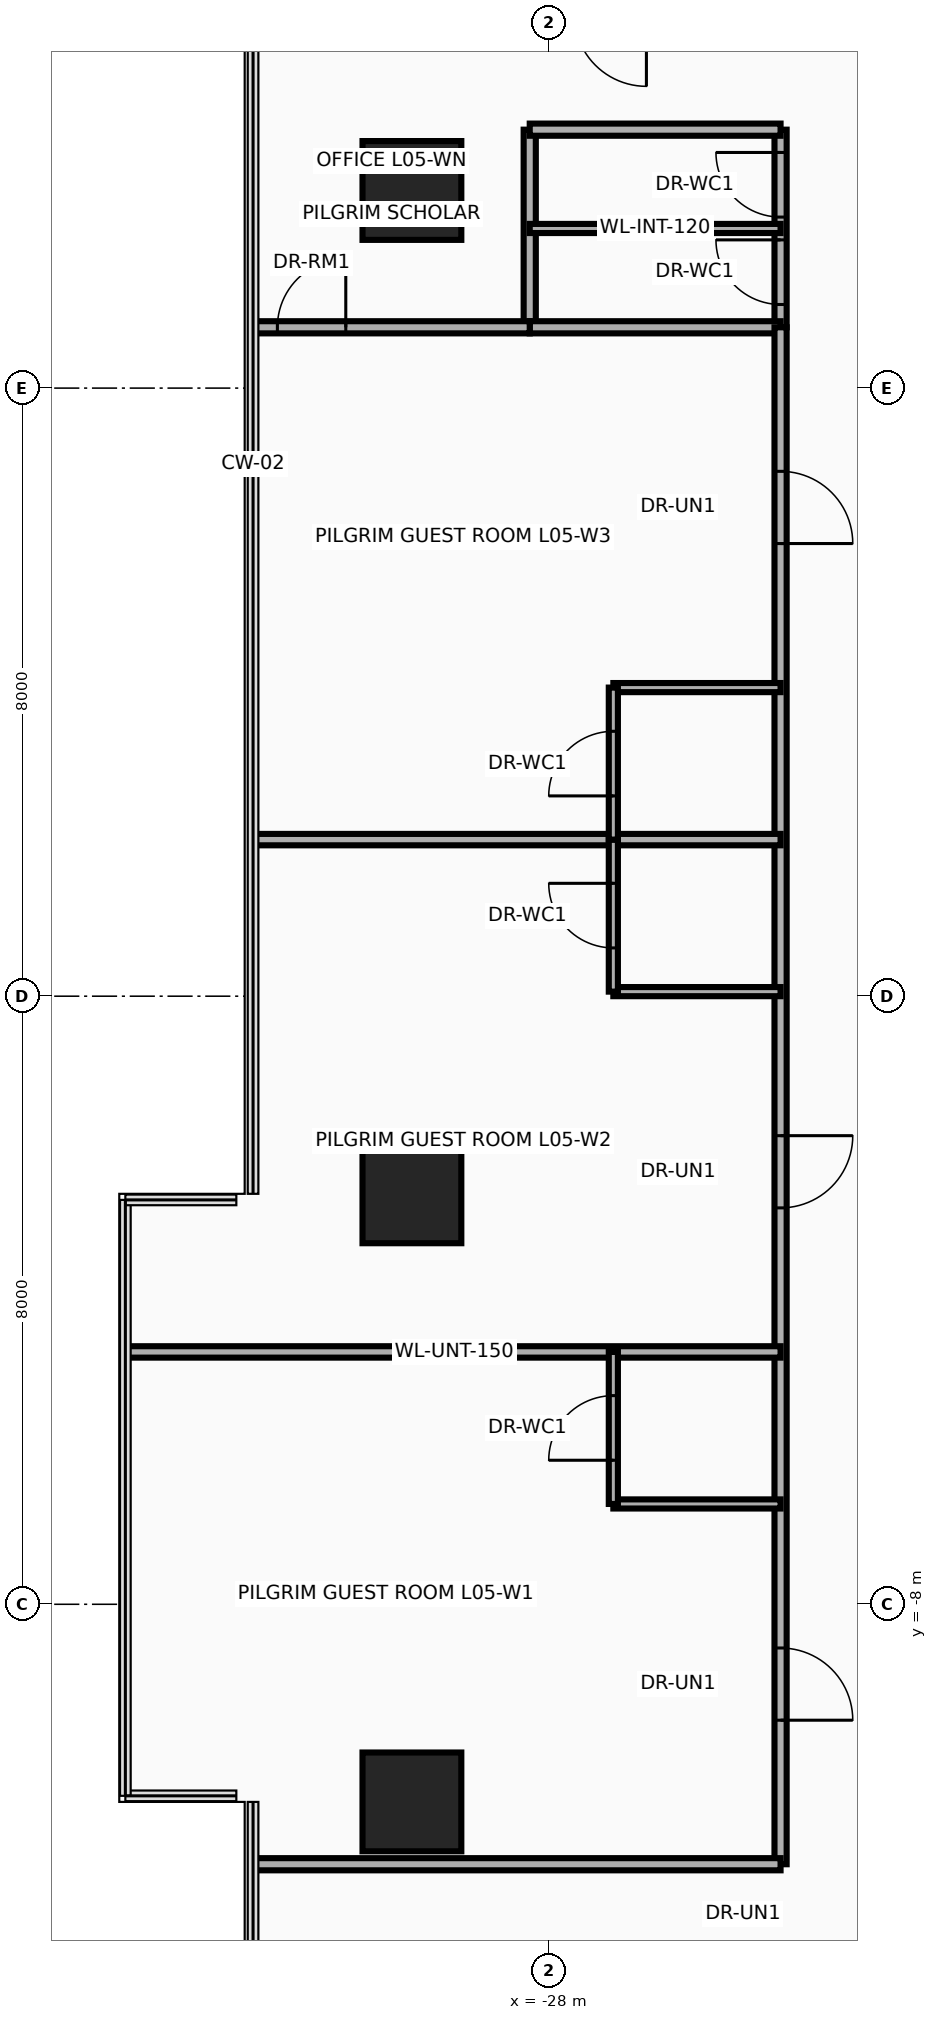
"""IFC4 building model, lengths in metres.
Left out: names, types, materials, properties, quantities, classifications, styles, units other than length and angle.
Written with IfcOpenShell. Run it as: python <this file> out.ifc"""

import sys

from ifc_helpers import new_model, si_unit, direction, frame, frame_2d, origin, origin_2d, place, context, subcontext, project, spatial, rectangle, circle, extrude, source, transform, mapped, element, fill, save


model = new_model("IFC4")
c1 = context("Model", 3, precision=1e-05, world=origin(), true_north=direction((0.0, 1.0)))
c2 = subcontext(c1, "Body", "Model", "MODEL_VIEW")
j1 = project(units=[si_unit("LENGTHUNIT", "METRE"), si_unit("PLANEANGLEUNIT", "RADIAN")], contexts=[c1])
p1 = place(None, origin())
s1 = spatial("IfcSite", under=j1, at=p1, CompositionType="ELEMENT")
p2 = place(p1, origin())
s2 = spatial("IfcBuilding", under=s1, at=p2, CompositionType="ELEMENT")
p3 = place(p2, frame((0.0, 0.0, 26.0)))
s3 = spatial("IfcBuildingStorey", under=s2, at=p3, CompositionType="ELEMENT", Elevation=26.0)
m1 = source(origin(), c2, "Body", "SweptSolid", [
    extrude(circle(Radius=0.65, at=origin_2d()), origin(), (0.0, 0.0, 1.0), 3.7),
])
for number, where, z_axis, x_axis in (
    (1, (-29.8, -10.6, 0.0), (0.0, 0.0, 1.0), (1.0, 0.0, 0.0)),
    (2, (-29.8, -2.6, 0.0), (0.0, 0.0, 1.0), (1.0, 0.0, 0.0)),
    (3, (-29.8, 10.6, 0.0), (0.0, 0.0, 1.0), (1.0, 0.0, 0.0)),
):
    element("IfcColumn", number, at=place(p3, frame(where, z_axis=z_axis, x_axis=x_axis)), inside=s3, PredefinedType="COLUMN", context=c2, shape_type="MappedRepresentation", body=[
        mapped(m1, transform((0.0, 0.0, 0.0), x_axis=(1.0, 0.0, 0.0), y_axis=(0.0, 1.0, 0.0), z_axis=(0.0, 0.0, 1.0), scale=1.0)),
    ])
p4 = place(p3, frame((-28.25, 8.8, 0.0), z_axis=(0.0, 0.0, 1.0), x_axis=(0.0, 1.0, 0.0)))
e4 = element("IfcWall", 4, at=p4, inside=s3, PredefinedType="PARTITIONING", context=c2, shape_type="SweptSolid", body=[
    extrude(rectangle(XDim=2.6, YDim=0.16, at=frame_2d((1.3, 0.0))), origin(), (0.0, 0.0, 1.0), 2.583),
])
p5 = place(p3, frame((-24.95, 8.8, 0.0), z_axis=(0.0, 0.0, 1.0), x_axis=(0.0, 1.0, 0.0)))
e5 = element("IfcWall", 5, at=p5, inside=s3, PredefinedType="PARTITIONING", context=c2, shape_type="SweptSolid", body=[
    extrude(rectangle(XDim=2.6, YDim=0.16, at=frame_2d((1.3, 0.0))), origin(), (0.0, 0.0, 1.0), 2.583),
])
p6 = place(p5, frame((0.3, 0.0, 0.0)))
e6 = element("IfcOpeningElement", 6, at=p6, cuts=e5, PredefinedType="OPENING", context=c2, shape_type="SweptSolid", body=[
    extrude(rectangle(XDim=0.85, YDim=2.1, at=frame_2d((0.425, 1.05))), frame((0.0, 0.095, 0.0), z_axis=(0.0, -1.0, 0.0), x_axis=(1.0, 0.0, 0.0)), (0.0, 0.0, 1.0), 0.19),
])
p7 = place(p5, frame((1.45, 0.0, 0.0)))
e7 = element("IfcOpeningElement", 7, at=p7, cuts=e5, PredefinedType="OPENING", context=c2, shape_type="SweptSolid", body=[
    extrude(rectangle(XDim=0.85, YDim=2.1, at=frame_2d((0.425, 1.05))), frame((0.0, 0.095, 0.0), z_axis=(0.0, -1.0, 0.0), x_axis=(1.0, 0.0, 0.0)), (0.0, 0.0, 1.0), 0.19),
])
for number, where, z_axis, x_axis in (
    (8, (-28.25, 8.8, 0.0), (0.0, 0.0, 1.0), (1.0, 0.0, 0.0)),
    (9, (-28.25, 11.4, 0.0), (0.0, 0.0, 1.0), (1.0, 0.0, 0.0)),
):
    element("IfcWall", number, at=place(p3, frame(where, z_axis=z_axis, x_axis=x_axis)), inside=s3, PredefinedType="PARTITIONING", context=c2, shape_type="SweptSolid", body=[
        extrude(rectangle(XDim=3.3, YDim=0.16, at=frame_2d((1.65, 0.0))), origin(), (0.0, 0.0, 1.0), 3.46),
    ])
p8 = place(p3, frame((-28.25, 10.1, 0.0), z_axis=(0.0, 0.0, 1.0), x_axis=(1.0, 0.0, 0.0)))
e10 = element("IfcWall", 10, at=p8, inside=s3, PredefinedType="PARTITIONING", context=c2, shape_type="SweptSolid", body=[
    extrude(rectangle(XDim=3.3, YDim=0.12, at=frame_2d((1.65, 0.0))), origin(), (0.0, 0.0, 1.0), 3.46),
])
p9 = place(p3, frame((-24.95, -11.42, 0.0), z_axis=(0.0, 0.0, 1.0), x_axis=(0.0, 1.0, 0.0)))
e11 = element("IfcWall", 11, at=p9, inside=s3, PredefinedType="PARTITIONING", context=c2, shape_type="SweptSolid", body=[
    extrude(rectangle(XDim=20.22, YDim=0.16, at=frame_2d((10.11, 0.0))), origin(), (0.0, 0.0, 1.0), 2.583),
])
p10 = place(p9, frame((1.895, 0.0, 0.0)))
e12 = element("IfcOpeningElement", 12, at=p10, cuts=e11, PredefinedType="OPENING", context=c2, shape_type="SweptSolid", body=[
    extrude(rectangle(XDim=0.95, YDim=2.15, at=frame_2d((0.475, 1.075))), frame((0.0, 0.095, 0.0), z_axis=(0.0, -1.0, 0.0), x_axis=(1.0, 0.0, 0.0)), (0.0, 0.0, 1.0), 0.19),
])
p11 = place(p9, frame((8.635, 0.0, 0.0)))
e13 = element("IfcOpeningElement", 13, at=p11, cuts=e11, PredefinedType="OPENING", context=c2, shape_type="SweptSolid", body=[
    extrude(rectangle(XDim=0.95, YDim=2.15, at=frame_2d((0.475, 1.075))), frame((0.0, 0.095, 0.0), z_axis=(0.0, -1.0, 0.0), x_axis=(1.0, 0.0, 0.0)), (0.0, 0.0, 1.0), 0.19),
])
p12 = place(p9, frame((17.375, 0.0, 0.0)))
e14 = element("IfcOpeningElement", 14, at=p12, cuts=e11, PredefinedType="OPENING", context=c2, shape_type="SweptSolid", body=[
    extrude(rectangle(XDim=0.95, YDim=2.15, at=frame_2d((0.475, 1.075))), frame((0.0, 0.095, 0.0), z_axis=(0.0, -1.0, 0.0), x_axis=(1.0, 0.0, 0.0)), (0.0, 0.0, 1.0), 0.19),
])
p13 = place(p3, frame((-31.89, 8.8, 0.0), z_axis=(0.0, 0.0, 1.0), x_axis=(1.0, 0.0, 0.0)))
e15 = element("IfcWall", 15, at=p13, inside=s3, PredefinedType="PARTITIONING", context=c2, shape_type="SweptSolid", body=[
    extrude(rectangle(XDim=3.64, YDim=0.16, at=frame_2d((1.82, 0.0))), origin(), (0.0, 0.0, 1.0), 2.896),
])
p14 = place(p13, frame((0.32, 0.0, 0.0)))
e16 = element("IfcOpeningElement", 16, at=p14, cuts=e15, PredefinedType="OPENING", context=c2, shape_type="SweptSolid", body=[
    extrude(rectangle(XDim=0.9, YDim=2.1, at=frame_2d((0.45, 1.05))), frame((0.0, 0.095, 0.0), z_axis=(0.0, -1.0, 0.0), x_axis=(1.0, 0.0, 0.0)), (0.0, 0.0, 1.0), 0.19),
])
p15 = place(p3, frame((-33.54, -4.68, 0.0), z_axis=(0.0, 0.0, 1.0), x_axis=(1.0, 0.0, 0.0)))
e17 = element("IfcWall", 17, at=p15, inside=s3, PredefinedType="PARTITIONING", context=c2, shape_type="SweptSolid", body=[
    extrude(rectangle(XDim=8.59, YDim=0.15, at=frame_2d((4.295, 0.0))), origin(), (0.0, 0.0, 1.0), 2.896),
])
p16 = place(p3, frame((-31.89, 2.06, 0.0), z_axis=(0.0, 0.0, 1.0), x_axis=(1.0, 0.0, 0.0)))
e18 = element("IfcWall", 18, at=p16, inside=s3, PredefinedType="PARTITIONING", context=c2, shape_type="SweptSolid", body=[
    extrude(rectangle(XDim=6.94, YDim=0.15, at=frame_2d((3.47, 0.0))), origin(), (0.0, 0.0, 1.0), 2.896),
])
p17 = place(p3, frame((-27.15, -6.68, 0.0), z_axis=(0.0, 0.0, 1.0), x_axis=(1.0, 0.0, 0.0)))
e19 = element("IfcWall", 19, at=p17, inside=s3, PredefinedType="PARTITIONING", context=c2, shape_type="SweptSolid", body=[
    extrude(rectangle(XDim=2.2, YDim=0.12, at=frame_2d((1.1, 0.0))), origin(), (0.0, 0.0, 1.0), 2.979),
])
p18 = place(p3, frame((-27.15, -6.68, 0.0), z_axis=(0.0, 0.0, 1.0), x_axis=(0.0, 1.0, 0.0)))
e20 = element("IfcWall", 20, at=p18, inside=s3, PredefinedType="PARTITIONING", context=c2, shape_type="SweptSolid", body=[
    extrude(rectangle(XDim=2.0, YDim=0.12, at=frame_2d((1.0, 0.0))), origin(), (0.0, 0.0, 1.0), 2.979),
])
p19 = place(p18, frame((0.575, 0.0, 0.0)))
e21 = element("IfcOpeningElement", 21, at=p19, cuts=e20, PredefinedType="OPENING", context=c2, shape_type="SweptSolid", body=[
    extrude(rectangle(XDim=0.85, YDim=2.1, at=frame_2d((0.425, 1.05))), frame((0.0, 0.075, 0.0), z_axis=(0.0, -1.0, 0.0), x_axis=(1.0, 0.0, 0.0)), (0.0, 0.0, 1.0), 0.15),
])
p20 = place(p3, frame((-27.15, 0.06, 0.0), z_axis=(0.0, 0.0, 1.0), x_axis=(1.0, 0.0, 0.0)))
e22 = element("IfcWall", 22, at=p20, inside=s3, PredefinedType="PARTITIONING", context=c2, shape_type="SweptSolid", body=[
    extrude(rectangle(XDim=2.2, YDim=0.12, at=frame_2d((1.1, 0.0))), origin(), (0.0, 0.0, 1.0), 2.979),
])
p21 = place(p3, frame((-27.15, 0.06, 0.0), z_axis=(0.0, 0.0, 1.0), x_axis=(0.0, 1.0, 0.0)))
e23 = element("IfcWall", 23, at=p21, inside=s3, PredefinedType="PARTITIONING", context=c2, shape_type="SweptSolid", body=[
    extrude(rectangle(XDim=2.0, YDim=0.12, at=frame_2d((1.0, 0.0))), origin(), (0.0, 0.0, 1.0), 2.979),
])
p22 = place(p21, frame((0.575, 0.0, 0.0)))
e24 = element("IfcOpeningElement", 24, at=p22, cuts=e23, PredefinedType="OPENING", context=c2, shape_type="SweptSolid", body=[
    extrude(rectangle(XDim=0.85, YDim=2.1, at=frame_2d((0.425, 1.05))), frame((0.0, 0.075, 0.0), z_axis=(0.0, -1.0, 0.0), x_axis=(1.0, 0.0, 0.0)), (0.0, 0.0, 1.0), 0.15),
])
p23 = place(p3, frame((-27.15, 4.06, 0.0), z_axis=(0.0, 0.0, 1.0), x_axis=(1.0, 0.0, 0.0)))
e25 = element("IfcWall", 25, at=p23, inside=s3, PredefinedType="PARTITIONING", context=c2, shape_type="SweptSolid", body=[
    extrude(rectangle(XDim=2.2, YDim=0.12, at=frame_2d((1.1, 0.0))), origin(), (0.0, 0.0, 1.0), 3.46),
])
p24 = place(p3, frame((-27.15, 2.06, 0.0), z_axis=(0.0, 0.0, 1.0), x_axis=(0.0, 1.0, 0.0)))
e26 = element("IfcWall", 26, at=p24, inside=s3, PredefinedType="PARTITIONING", context=c2, shape_type="SweptSolid", body=[
    extrude(rectangle(XDim=2.0, YDim=0.12, at=frame_2d((1.0, 0.0))), origin(), (0.0, 0.0, 1.0), 2.979),
])
p25 = place(p24, frame((0.575, 0.0, 0.0)))
e27 = element("IfcOpeningElement", 27, at=p25, cuts=e26, PredefinedType="OPENING", context=c2, shape_type="SweptSolid", body=[
    extrude(rectangle(XDim=0.85, YDim=2.1, at=frame_2d((0.425, 1.05))), frame((0.0, 0.075, 0.0), z_axis=(0.0, -1.0, 0.0), x_axis=(1.0, 0.0, 0.0)), (0.0, 0.0, 1.0), 0.15),
])
p26 = place(p3, frame((-31.89, -11.42, 0.0), z_axis=(0.0, 0.0, 1.0), x_axis=(1.0, 0.0, 0.0)))
e28 = element("IfcWall", 28, at=p26, inside=s3, PredefinedType="PARTITIONING", context=c2, shape_type="SweptSolid", body=[
    extrude(rectangle(XDim=6.94, YDim=0.16, at=frame_2d((3.47, 0.0))), origin(), (0.0, 0.0, 1.0), 3.46),
])
p27 = place(p6, origin())
e29 = element("IfcDoor", 29, at=p27, inside=s3, OperationType="SINGLE_SWING_RIGHT", PredefinedType="DOOR", context=c2, shape_type="SweptSolid", body=[
    extrude(rectangle(XDim=0.85, YDim=2.1, at=frame_2d((0.425, 1.05))), frame((0.0, 0.025, 0.0), z_axis=(0.0, -1.0, 0.0), x_axis=(1.0, 0.0, 0.0)), (0.0, 0.0, 1.0), 0.05),
])
fill(e6, e29)
p28 = place(p7, origin())
e30 = element("IfcDoor", 30, at=p28, inside=s3, OperationType="SINGLE_SWING_LEFT", PredefinedType="DOOR", context=c2, shape_type="SweptSolid", body=[
    extrude(rectangle(XDim=0.85, YDim=2.1, at=frame_2d((0.425, 1.05))), frame((0.0, 0.025, 0.0), z_axis=(0.0, -1.0, 0.0), x_axis=(1.0, 0.0, 0.0)), (0.0, 0.0, 1.0), 0.05),
])
fill(e7, e30)
p29 = place(p14, origin())
e31 = element("IfcDoor", 31, at=p29, inside=s3, OperationType="SINGLE_SWING_RIGHT", PredefinedType="DOOR", context=c2, shape_type="SweptSolid", body=[
    extrude(rectangle(XDim=0.9, YDim=2.1, at=frame_2d((0.45, 1.05))), frame((0.0, 0.025, 0.0), z_axis=(0.0, -1.0, 0.0), x_axis=(1.0, 0.0, 0.0)), (0.0, 0.0, 1.0), 0.05),
])
fill(e16, e31)
p30 = place(p10, frame((0.95, 0.0, 0.0), z_axis=(0.0, 0.0, 1.0), x_axis=(-1.0, 0.0, 0.0)))
e32 = element("IfcDoor", 32, at=p30, inside=s3, OperationType="SINGLE_SWING_LEFT", PredefinedType="DOOR", context=c2, shape_type="SweptSolid", body=[
    extrude(rectangle(XDim=0.95, YDim=2.15, at=frame_2d((0.475, 1.075))), frame((0.0, 0.025, 0.0), z_axis=(0.0, -1.0, 0.0), x_axis=(1.0, 0.0, 0.0)), (0.0, 0.0, 1.0), 0.05),
])
fill(e12, e32)
p31 = place(p19, origin())
e33 = element("IfcDoor", 33, at=p31, inside=s3, OperationType="SINGLE_SWING_RIGHT", PredefinedType="DOOR", context=c2, shape_type="SweptSolid", body=[
    extrude(rectangle(XDim=0.85, YDim=2.1, at=frame_2d((0.425, 1.05))), frame((0.0, 0.025, 0.0), z_axis=(0.0, -1.0, 0.0), x_axis=(1.0, 0.0, 0.0)), (0.0, 0.0, 1.0), 0.05),
])
fill(e21, e33)
p32 = place(p11, frame((0.95, 0.0, 0.0), z_axis=(0.0, 0.0, 1.0), x_axis=(-1.0, 0.0, 0.0)))
e34 = element("IfcDoor", 34, at=p32, inside=s3, OperationType="SINGLE_SWING_LEFT", PredefinedType="DOOR", context=c2, shape_type="SweptSolid", body=[
    extrude(rectangle(XDim=0.95, YDim=2.15, at=frame_2d((0.475, 1.075))), frame((0.0, 0.025, 0.0), z_axis=(0.0, -1.0, 0.0), x_axis=(1.0, 0.0, 0.0)), (0.0, 0.0, 1.0), 0.05),
])
fill(e13, e34)
p33 = place(p22, origin())
e35 = element("IfcDoor", 35, at=p33, inside=s3, OperationType="SINGLE_SWING_RIGHT", PredefinedType="DOOR", context=c2, shape_type="SweptSolid", body=[
    extrude(rectangle(XDim=0.85, YDim=2.1, at=frame_2d((0.425, 1.05))), frame((0.0, 0.025, 0.0), z_axis=(0.0, -1.0, 0.0), x_axis=(1.0, 0.0, 0.0)), (0.0, 0.0, 1.0), 0.05),
])
fill(e24, e35)
p34 = place(p12, frame((0.95, 0.0, 0.0), z_axis=(0.0, 0.0, 1.0), x_axis=(-1.0, 0.0, 0.0)))
e36 = element("IfcDoor", 36, at=p34, inside=s3, OperationType="SINGLE_SWING_LEFT", PredefinedType="DOOR", context=c2, shape_type="SweptSolid", body=[
    extrude(rectangle(XDim=0.95, YDim=2.15, at=frame_2d((0.475, 1.075))), frame((0.0, 0.025, 0.0), z_axis=(0.0, -1.0, 0.0), x_axis=(1.0, 0.0, 0.0)), (0.0, 0.0, 1.0), 0.05),
])
fill(e14, e36)
p35 = place(p25, origin())
e37 = element("IfcDoor", 37, at=p35, inside=s3, OperationType="SINGLE_SWING_RIGHT", PredefinedType="DOOR", context=c2, shape_type="SweptSolid", body=[
    extrude(rectangle(XDim=0.85, YDim=2.1, at=frame_2d((0.425, 1.05))), frame((0.0, 0.025, 0.0), z_axis=(0.0, -1.0, 0.0), x_axis=(1.0, 0.0, 0.0)), (0.0, 0.0, 1.0), 0.05),
])
fill(e27, e37)
save(model, sys.argv[1])
